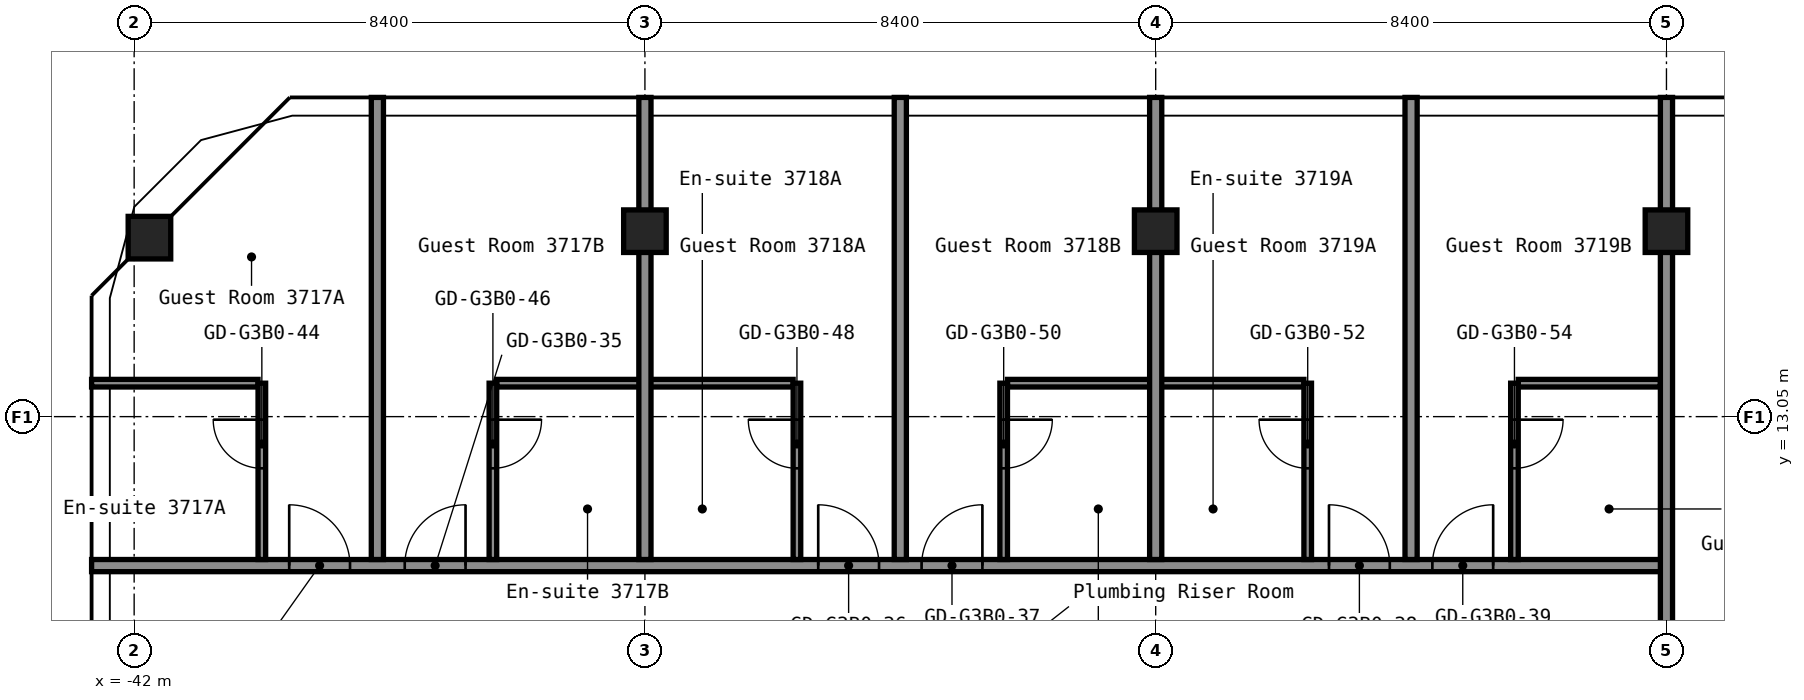
"""IFC4 building model, lengths in metres.
Left out: names, types, materials, properties, quantities, classifications, styles, units other than length and angle.
Written with IfcOpenShell. Run it as: python <this file> out.ifc"""

import sys

from ifc_helpers import new_model, si_unit, direction, frame, frame_2d, origin, origin_2d, place, context, subcontext, project, spatial, rectangle, hollow_rectangle, extrude, element, fill, save


model = new_model("IFC4")
c1 = context("Model", 3, precision=1e-05, world=origin(), true_north=direction((0.0, 1.0)))
c2 = subcontext(c1, "Body", "Model", "MODEL_VIEW")
j1 = project(units=[si_unit("LENGTHUNIT", "METRE"), si_unit("PLANEANGLEUNIT", "RADIAN")], contexts=[c1])
p1 = place(None, origin())
s1 = spatial("IfcSite", under=j1, at=p1, CompositionType="ELEMENT")
p2 = place(p1, origin())
s2 = spatial("IfcBuilding", under=s1, at=p2, CompositionType="ELEMENT")
p3 = place(p2, frame((0.0, 0.0, 134.2)))
s3 = spatial("IfcBuildingStorey", under=s2, at=p3, CompositionType="ELEMENT", Elevation=134.2)
for number, where, z_axis, x_axis in (
    (1, (-41.749, 15.994, 0.0), (0.0, 0.0, 1.0), (1.0, 0.0, 0.0)),
    (2, (-33.6, 16.1, 0.0), (0.0, 0.0, 1.0), (1.0, 0.0, 0.0)),
    (3, (-25.2, 16.1, 0.0), (0.0, 0.0, 1.0), (1.0, 0.0, 0.0)),
    (4, (-16.8, 16.1, 0.0), (0.0, 0.0, 1.0), (1.0, 0.0, 0.0)),
):
    element("IfcColumn", number, at=place(p3, frame(where, z_axis=z_axis, x_axis=x_axis)), inside=s3, PredefinedType="COLUMN", context=c2, shape_type="SweptSolid", body=[
        extrude(hollow_rectangle(XDim=0.7, YDim=0.7, WallThickness=0.028, at=origin_2d()), origin(), (0.0, 0.0, 1.0), 2.75),
    ])
p4 = place(p3, frame((-42.7, 10.6, 0.0), z_axis=(0.0, 0.0, 1.0), x_axis=(1.0, 0.0, 0.0)))
e5 = element("IfcWall", 5, at=p4, inside=s3, PredefinedType="PARTITIONING", context=c2, shape_type="SweptSolid", body=[
    extrude(rectangle(XDim=25.9, YDim=0.2, at=frame_2d((12.95, 0.0))), origin(), (0.0, 0.0, 1.0), 2.75),
])
p5 = place(p4, frame((3.25, 0.0, 0.0)))
e6 = element("IfcOpeningElement", 6, at=p5, cuts=e5, PredefinedType="OPENING", context=c2, shape_type="SweptSolid", body=[
    extrude(rectangle(XDim=1.0, YDim=2.1, at=frame_2d((0.5, 1.05))), frame((0.0, 0.11, 0.0), z_axis=(0.0, -1.0, 0.0), x_axis=(1.0, 0.0, 0.0)), (0.0, 0.0, 1.0), 0.22),
])
p6 = place(p4, frame((5.15, 0.0, 0.0)))
e7 = element("IfcOpeningElement", 7, at=p6, cuts=e5, PredefinedType="OPENING", context=c2, shape_type="SweptSolid", body=[
    extrude(rectangle(XDim=1.0, YDim=2.1, at=frame_2d((0.5, 1.05))), frame((0.0, 0.11, 0.0), z_axis=(0.0, -1.0, 0.0), x_axis=(1.0, 0.0, 0.0)), (0.0, 0.0, 1.0), 0.22),
])
p7 = place(p4, frame((11.95, 0.0, 0.0)))
e8 = element("IfcOpeningElement", 8, at=p7, cuts=e5, PredefinedType="OPENING", context=c2, shape_type="SweptSolid", body=[
    extrude(rectangle(XDim=1.0, YDim=2.1, at=frame_2d((0.5, 1.05))), frame((0.0, 0.11, 0.0), z_axis=(0.0, -1.0, 0.0), x_axis=(1.0, 0.0, 0.0)), (0.0, 0.0, 1.0), 0.22),
])
p8 = place(p4, frame((13.65, 0.0, 0.0)))
e9 = element("IfcOpeningElement", 9, at=p8, cuts=e5, PredefinedType="OPENING", context=c2, shape_type="SweptSolid", body=[
    extrude(rectangle(XDim=1.0, YDim=2.1, at=frame_2d((0.5, 1.05))), frame((0.0, 0.11, 0.0), z_axis=(0.0, -1.0, 0.0), x_axis=(1.0, 0.0, 0.0)), (0.0, 0.0, 1.0), 0.22),
])
p9 = place(p4, frame((20.35, 0.0, 0.0)))
e10 = element("IfcOpeningElement", 10, at=p9, cuts=e5, PredefinedType="OPENING", context=c2, shape_type="SweptSolid", body=[
    extrude(rectangle(XDim=1.0, YDim=2.1, at=frame_2d((0.5, 1.05))), frame((0.0, 0.11, 0.0), z_axis=(0.0, -1.0, 0.0), x_axis=(1.0, 0.0, 0.0)), (0.0, 0.0, 1.0), 0.22),
])
p10 = place(p4, frame((22.05, 0.0, 0.0)))
e11 = element("IfcOpeningElement", 11, at=p10, cuts=e5, PredefinedType="OPENING", context=c2, shape_type="SweptSolid", body=[
    extrude(rectangle(XDim=1.0, YDim=2.1, at=frame_2d((0.5, 1.05))), frame((0.0, 0.11, 0.0), z_axis=(0.0, -1.0, 0.0), x_axis=(1.0, 0.0, 0.0)), (0.0, 0.0, 1.0), 0.22),
])
p11 = place(p3, frame((-42.7, 13.6, 0.0), z_axis=(0.0, 0.0, 1.0), x_axis=(1.0, 0.0, 0.0)))
e12 = element("IfcWall", 12, at=p11, inside=s3, PredefinedType="PARTITIONING", context=c2, shape_type="SweptSolid", body=[
    extrude(rectangle(XDim=2.738, YDim=0.125, at=frame_2d((1.369, 0.0))), origin(), (0.0, 0.0, 1.0), 2.75),
])
for number, where, z_axis, x_axis in (
    (13, (-36.038, 13.6, 0.0), (0.0, 0.0, 1.0), (1.0, 0.0, 0.0)),
    (14, (-27.637, 13.6, 0.0), (0.0, 0.0, 1.0), (1.0, 0.0, 0.0)),
):
    element("IfcWall", number, at=place(p3, frame(where, z_axis=z_axis, x_axis=x_axis)), inside=s3, PredefinedType="PARTITIONING", context=c2, shape_type="SweptSolid", body=[
        extrude(rectangle(XDim=4.875, YDim=0.125, at=frame_2d((2.438, 0.0))), origin(), (0.0, 0.0, 1.0), 2.75),
    ])
p12 = place(p3, frame((-19.238, 13.6, 0.0), z_axis=(0.0, 0.0, 1.0), x_axis=(1.0, 0.0, 0.0)))
e15 = element("IfcWall", 15, at=p12, inside=s3, PredefinedType="PARTITIONING", context=c2, shape_type="SweptSolid", body=[
    extrude(rectangle(XDim=2.338, YDim=0.125, at=frame_2d((1.169, 0.0))), origin(), (0.0, 0.0, 1.0), 2.75),
])
p13 = place(p3, frame((-39.9, 10.7, 0.0), z_axis=(0.0, 0.0, 1.0), x_axis=(0.0, 1.0, 0.0)))
e16 = element("IfcWall", 16, at=p13, inside=s3, PredefinedType="PARTITIONING", context=c2, shape_type="SweptSolid", body=[
    extrude(rectangle(XDim=2.9, YDim=0.125, at=frame_2d((1.45, 0.0))), origin(), (0.0, 0.0, 1.0), 2.75),
])
p14 = place(p13, frame((1.5, 0.0, 0.0)))
e17 = element("IfcOpeningElement", 17, at=p14, cuts=e16, PredefinedType="OPENING", context=c2, shape_type="SweptSolid", body=[
    extrude(rectangle(XDim=0.8, YDim=2.1, at=frame_2d((0.4, 1.05))), frame((0.0, 0.073, 0.0), z_axis=(0.0, -1.0, 0.0), x_axis=(1.0, 0.0, 0.0)), (0.0, 0.0, 1.0), 0.145),
])
p15 = place(p3, frame((-38.0, 10.7, 0.0), z_axis=(0.0, 0.0, 1.0), x_axis=(0.0, 1.0, 0.0)))
e18 = element("IfcWall", 18, at=p15, inside=s3, PredefinedType="PARTITIONING", context=c2, shape_type="SweptSolid", body=[
    extrude(rectangle(XDim=7.6, YDim=0.2, at=frame_2d((3.8, 0.0))), origin(), (0.0, 0.0, 1.0), 2.75),
])
p16 = place(p3, frame((-36.1, 10.7, 0.0), z_axis=(0.0, 0.0, 1.0), x_axis=(0.0, 1.0, 0.0)))
e19 = element("IfcWall", 19, at=p16, inside=s3, PredefinedType="PARTITIONING", context=c2, shape_type="SweptSolid", body=[
    extrude(rectangle(XDim=2.9, YDim=0.125, at=frame_2d((1.45, 0.0))), origin(), (0.0, 0.0, 1.0), 2.75),
])
p17 = place(p16, frame((1.5, 0.0, 0.0)))
e20 = element("IfcOpeningElement", 20, at=p17, cuts=e19, PredefinedType="OPENING", context=c2, shape_type="SweptSolid", body=[
    extrude(rectangle(XDim=0.8, YDim=2.1, at=frame_2d((0.4, 1.05))), frame((0.0, 0.073, 0.0), z_axis=(0.0, -1.0, 0.0), x_axis=(1.0, 0.0, 0.0)), (0.0, 0.0, 1.0), 0.145),
])
p18 = place(p3, frame((-33.6, 10.7, 0.0), z_axis=(0.0, 0.0, 1.0), x_axis=(0.0, 1.0, 0.0)))
e21 = element("IfcWall", 21, at=p18, inside=s3, PredefinedType="PARTITIONING", context=c2, shape_type="SweptSolid", body=[
    extrude(rectangle(XDim=7.6, YDim=0.2, at=frame_2d((3.8, 0.0))), origin(), (0.0, 0.0, 1.0), 2.75),
])
p19 = place(p3, frame((-31.1, 10.7, 0.0), z_axis=(0.0, 0.0, 1.0), x_axis=(0.0, 1.0, 0.0)))
e22 = element("IfcWall", 22, at=p19, inside=s3, PredefinedType="PARTITIONING", context=c2, shape_type="SweptSolid", body=[
    extrude(rectangle(XDim=2.9, YDim=0.125, at=frame_2d((1.45, 0.0))), origin(), (0.0, 0.0, 1.0), 2.75),
])
p20 = place(p19, frame((1.5, 0.0, 0.0)))
e23 = element("IfcOpeningElement", 23, at=p20, cuts=e22, PredefinedType="OPENING", context=c2, shape_type="SweptSolid", body=[
    extrude(rectangle(XDim=0.8, YDim=2.1, at=frame_2d((0.4, 1.05))), frame((0.0, 0.073, 0.0), z_axis=(0.0, -1.0, 0.0), x_axis=(1.0, 0.0, 0.0)), (0.0, 0.0, 1.0), 0.145),
])
p21 = place(p3, frame((-29.4, 10.7, 0.0), z_axis=(0.0, 0.0, 1.0), x_axis=(0.0, 1.0, 0.0)))
e24 = element("IfcWall", 24, at=p21, inside=s3, PredefinedType="PARTITIONING", context=c2, shape_type="SweptSolid", body=[
    extrude(rectangle(XDim=7.6, YDim=0.2, at=frame_2d((3.8, 0.0))), origin(), (0.0, 0.0, 1.0), 2.75),
])
p22 = place(p3, frame((-27.7, 10.7, 0.0), z_axis=(0.0, 0.0, 1.0), x_axis=(0.0, 1.0, 0.0)))
e25 = element("IfcWall", 25, at=p22, inside=s3, PredefinedType="PARTITIONING", context=c2, shape_type="SweptSolid", body=[
    extrude(rectangle(XDim=2.9, YDim=0.125, at=frame_2d((1.45, 0.0))), origin(), (0.0, 0.0, 1.0), 2.75),
])
p23 = place(p22, frame((1.5, 0.0, 0.0)))
e26 = element("IfcOpeningElement", 26, at=p23, cuts=e25, PredefinedType="OPENING", context=c2, shape_type="SweptSolid", body=[
    extrude(rectangle(XDim=0.8, YDim=2.1, at=frame_2d((0.4, 1.05))), frame((0.0, 0.073, 0.0), z_axis=(0.0, -1.0, 0.0), x_axis=(1.0, 0.0, 0.0)), (0.0, 0.0, 1.0), 0.145),
])
p24 = place(p3, frame((-25.2, 10.7, 0.0), z_axis=(0.0, 0.0, 1.0), x_axis=(0.0, 1.0, 0.0)))
e27 = element("IfcWall", 27, at=p24, inside=s3, PredefinedType="PARTITIONING", context=c2, shape_type="SweptSolid", body=[
    extrude(rectangle(XDim=7.6, YDim=0.2, at=frame_2d((3.8, 0.0))), origin(), (0.0, 0.0, 1.0), 2.75),
])
p25 = place(p3, frame((-22.7, 10.7, 0.0), z_axis=(0.0, 0.0, 1.0), x_axis=(0.0, 1.0, 0.0)))
e28 = element("IfcWall", 28, at=p25, inside=s3, PredefinedType="PARTITIONING", context=c2, shape_type="SweptSolid", body=[
    extrude(rectangle(XDim=2.9, YDim=0.125, at=frame_2d((1.45, 0.0))), origin(), (0.0, 0.0, 1.0), 2.75),
])
p26 = place(p25, frame((1.5, 0.0, 0.0)))
e29 = element("IfcOpeningElement", 29, at=p26, cuts=e28, PredefinedType="OPENING", context=c2, shape_type="SweptSolid", body=[
    extrude(rectangle(XDim=0.8, YDim=2.1, at=frame_2d((0.4, 1.05))), frame((0.0, 0.073, 0.0), z_axis=(0.0, -1.0, 0.0), x_axis=(1.0, 0.0, 0.0)), (0.0, 0.0, 1.0), 0.145),
])
p27 = place(p3, frame((-21.0, 10.7, 0.0), z_axis=(0.0, 0.0, 1.0), x_axis=(0.0, 1.0, 0.0)))
e30 = element("IfcWall", 30, at=p27, inside=s3, PredefinedType="PARTITIONING", context=c2, shape_type="SweptSolid", body=[
    extrude(rectangle(XDim=7.6, YDim=0.2, at=frame_2d((3.8, 0.0))), origin(), (0.0, 0.0, 1.0), 2.75),
])
p28 = place(p3, frame((-19.3, 10.7, 0.0), z_axis=(0.0, 0.0, 1.0), x_axis=(0.0, 1.0, 0.0)))
e31 = element("IfcWall", 31, at=p28, inside=s3, PredefinedType="PARTITIONING", context=c2, shape_type="SweptSolid", body=[
    extrude(rectangle(XDim=2.9, YDim=0.125, at=frame_2d((1.45, 0.0))), origin(), (0.0, 0.0, 1.0), 2.75),
])
p29 = place(p28, frame((1.5, 0.0, 0.0)))
e32 = element("IfcOpeningElement", 32, at=p29, cuts=e31, PredefinedType="OPENING", context=c2, shape_type="SweptSolid", body=[
    extrude(rectangle(XDim=0.8, YDim=2.1, at=frame_2d((0.4, 1.05))), frame((0.0, 0.073, 0.0), z_axis=(0.0, -1.0, 0.0), x_axis=(1.0, 0.0, 0.0)), (0.0, 0.0, 1.0), 0.145),
])
p30 = place(p3, frame((-16.8, 8.39, 0.0), z_axis=(0.0, 0.0, 1.0), x_axis=(0.0, 1.0, 0.0)))
e33 = element("IfcWall", 33, at=p30, inside=s3, PredefinedType="PARTITIONING", context=c2, shape_type="SweptSolid", body=[
    extrude(rectangle(XDim=9.91, YDim=0.2, at=frame_2d((4.955, 0.0))), origin(), (0.0, 0.0, 1.0), 2.75),
])
p31 = place(p5, origin())
e34 = element("IfcDoor", 34, at=p31, inside=s3, OperationType="SINGLE_SWING_RIGHT", PredefinedType="DOOR", context=c2, shape_type="SweptSolid", body=[
    extrude(rectangle(XDim=1.0, YDim=2.1, at=frame_2d((0.5, 1.05))), frame((0.0, 0.025, 0.0), z_axis=(0.0, -1.0, 0.0), x_axis=(1.0, 0.0, 0.0)), (0.0, 0.0, 1.0), 0.05),
])
fill(e6, e34)
p32 = place(p6, origin())
e35 = element("IfcDoor", 35, at=p32, inside=s3, OperationType="SINGLE_SWING_LEFT", PredefinedType="DOOR", context=c2, shape_type="SweptSolid", body=[
    extrude(rectangle(XDim=1.0, YDim=2.1, at=frame_2d((0.5, 1.05))), frame((0.0, 0.025, 0.0), z_axis=(0.0, -1.0, 0.0), x_axis=(1.0, 0.0, 0.0)), (0.0, 0.0, 1.0), 0.05),
])
fill(e7, e35)
p33 = place(p7, origin())
e36 = element("IfcDoor", 36, at=p33, inside=s3, OperationType="SINGLE_SWING_RIGHT", PredefinedType="DOOR", context=c2, shape_type="SweptSolid", body=[
    extrude(rectangle(XDim=1.0, YDim=2.1, at=frame_2d((0.5, 1.05))), frame((0.0, 0.025, 0.0), z_axis=(0.0, -1.0, 0.0), x_axis=(1.0, 0.0, 0.0)), (0.0, 0.0, 1.0), 0.05),
])
fill(e8, e36)
p34 = place(p8, origin())
e37 = element("IfcDoor", 37, at=p34, inside=s3, OperationType="SINGLE_SWING_LEFT", PredefinedType="DOOR", context=c2, shape_type="SweptSolid", body=[
    extrude(rectangle(XDim=1.0, YDim=2.1, at=frame_2d((0.5, 1.05))), frame((0.0, 0.025, 0.0), z_axis=(0.0, -1.0, 0.0), x_axis=(1.0, 0.0, 0.0)), (0.0, 0.0, 1.0), 0.05),
])
fill(e9, e37)
p35 = place(p9, origin())
e38 = element("IfcDoor", 38, at=p35, inside=s3, OperationType="SINGLE_SWING_RIGHT", PredefinedType="DOOR", context=c2, shape_type="SweptSolid", body=[
    extrude(rectangle(XDim=1.0, YDim=2.1, at=frame_2d((0.5, 1.05))), frame((0.0, 0.025, 0.0), z_axis=(0.0, -1.0, 0.0), x_axis=(1.0, 0.0, 0.0)), (0.0, 0.0, 1.0), 0.05),
])
fill(e10, e38)
p36 = place(p10, origin())
e39 = element("IfcDoor", 39, at=p36, inside=s3, OperationType="SINGLE_SWING_LEFT", PredefinedType="DOOR", context=c2, shape_type="SweptSolid", body=[
    extrude(rectangle(XDim=1.0, YDim=2.1, at=frame_2d((0.5, 1.05))), frame((0.0, 0.025, 0.0), z_axis=(0.0, -1.0, 0.0), x_axis=(1.0, 0.0, 0.0)), (0.0, 0.0, 1.0), 0.05),
])
fill(e11, e39)
p37 = place(p14, origin())
e40 = element("IfcDoor", 40, at=p37, inside=s3, OperationType="SINGLE_SWING_LEFT", PredefinedType="DOOR", context=c2, shape_type="SweptSolid", body=[
    extrude(rectangle(XDim=0.8, YDim=2.1, at=frame_2d((0.4, 1.05))), frame((0.0, 0.025, 0.0), z_axis=(0.0, -1.0, 0.0), x_axis=(1.0, 0.0, 0.0)), (0.0, 0.0, 1.0), 0.05),
])
fill(e17, e40)
p38 = place(p17, origin())
e41 = element("IfcDoor", 41, at=p38, inside=s3, OperationType="SINGLE_SWING_RIGHT", PredefinedType="DOOR", context=c2, shape_type="SweptSolid", body=[
    extrude(rectangle(XDim=0.8, YDim=2.1, at=frame_2d((0.4, 1.05))), frame((0.0, 0.025, 0.0), z_axis=(0.0, -1.0, 0.0), x_axis=(1.0, 0.0, 0.0)), (0.0, 0.0, 1.0), 0.05),
])
fill(e20, e41)
p39 = place(p20, origin())
e42 = element("IfcDoor", 42, at=p39, inside=s3, OperationType="SINGLE_SWING_LEFT", PredefinedType="DOOR", context=c2, shape_type="SweptSolid", body=[
    extrude(rectangle(XDim=0.8, YDim=2.1, at=frame_2d((0.4, 1.05))), frame((0.0, 0.025, 0.0), z_axis=(0.0, -1.0, 0.0), x_axis=(1.0, 0.0, 0.0)), (0.0, 0.0, 1.0), 0.05),
])
fill(e23, e42)
p40 = place(p23, origin())
e43 = element("IfcDoor", 43, at=p40, inside=s3, OperationType="SINGLE_SWING_RIGHT", PredefinedType="DOOR", context=c2, shape_type="SweptSolid", body=[
    extrude(rectangle(XDim=0.8, YDim=2.1, at=frame_2d((0.4, 1.05))), frame((0.0, 0.025, 0.0), z_axis=(0.0, -1.0, 0.0), x_axis=(1.0, 0.0, 0.0)), (0.0, 0.0, 1.0), 0.05),
])
fill(e26, e43)
p41 = place(p26, origin())
e44 = element("IfcDoor", 44, at=p41, inside=s3, OperationType="SINGLE_SWING_LEFT", PredefinedType="DOOR", context=c2, shape_type="SweptSolid", body=[
    extrude(rectangle(XDim=0.8, YDim=2.1, at=frame_2d((0.4, 1.05))), frame((0.0, 0.025, 0.0), z_axis=(0.0, -1.0, 0.0), x_axis=(1.0, 0.0, 0.0)), (0.0, 0.0, 1.0), 0.05),
])
fill(e29, e44)
p42 = place(p29, origin())
e45 = element("IfcDoor", 45, at=p42, inside=s3, OperationType="SINGLE_SWING_RIGHT", PredefinedType="DOOR", context=c2, shape_type="SweptSolid", body=[
    extrude(rectangle(XDim=0.8, YDim=2.1, at=frame_2d((0.4, 1.05))), frame((0.0, 0.025, 0.0), z_axis=(0.0, -1.0, 0.0), x_axis=(1.0, 0.0, 0.0)), (0.0, 0.0, 1.0), 0.05),
])
fill(e32, e45)
save(model, sys.argv[1])
